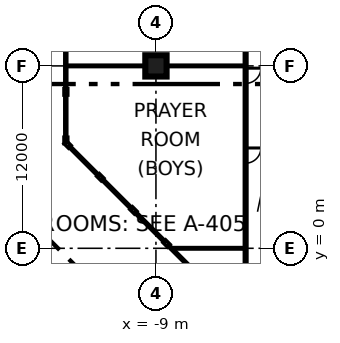
"""IFC4 building model, lengths in metres.
Left out: names, types, materials, properties, quantities, classifications, styles, units other than length and angle.
Written with IfcOpenShell. Run it as: python <this file> out.ifc"""

import sys

from ifc_helpers import new_model, si_unit, direction, frame, frame_2d, origin, origin_2d, place, context, subcontext, project, spatial, rectangle, extrude, element, fill, save


model = new_model("IFC4")
c1 = context("Model", 3, precision=1e-05, world=origin(), true_north=direction((0.0, 1.0)))
c2 = subcontext(c1, "Body", "Model", "MODEL_VIEW")
j1 = project(units=[si_unit("LENGTHUNIT", "METRE"), si_unit("PLANEANGLEUNIT", "RADIAN")], contexts=[c1])
p1 = place(None, origin())
s1 = spatial("IfcSite", under=j1, at=p1, CompositionType="ELEMENT")
p2 = place(p1, origin())
s2 = spatial("IfcBuilding", under=s1, at=p2, CompositionType="ELEMENT")
p3 = place(p2, origin())
s3 = spatial("IfcBuildingStorey", under=s2, at=p3, CompositionType="ELEMENT", Elevation=0.0)
p4 = place(p3, frame((-9.0, 12.0, 0.0), z_axis=(0.0, 0.0, 1.0), x_axis=(1.0, 0.0, 0.0)))
e1 = element("IfcColumn", 1, at=p4, inside=s3, PredefinedType="COLUMN", context=c2, shape_type="SweptSolid", body=[
    extrude(rectangle(XDim=1.4, YDim=1.4, at=origin_2d()), origin(), (0.0, 0.0, 1.0), 7.2),
])
p5 = place(p3, frame((-14.925, 12.0, 0.0), z_axis=(0.0, 0.0, 1.0), x_axis=(1.0, 0.0, 0.0)))
e2 = element("IfcWall", 2, at=p5, inside=s3, PredefinedType="PARTITIONING", context=c2, shape_type="SweptSolid", body=[
    extrude(rectangle(XDim=11.725, YDim=0.125, at=frame_2d((5.863, 0.0))), origin(), (0.0, 0.0, 1.0), 6.8),
])
p6 = place(p3, frame((-7.986, 0.0, 0.0), z_axis=(0.0, 0.0, 1.0), x_axis=(1.0, 0.0, 0.0)))
e3 = element("IfcWall", 3, at=p6, inside=s3, PredefinedType="PARTITIONING", context=c2, shape_type="SweptSolid", body=[
    extrude(rectangle(XDim=4.786, YDim=0.125, at=frame_2d((2.393, 0.0))), origin(), (0.0, 0.0, 1.0), 6.8),
])
p7 = place(p3, frame((-3.1, -3.0, 0.0), z_axis=(0.0, 0.0, 1.0), x_axis=(0.0, 1.0, 0.0)))
e4 = element("IfcWall", 4, at=p7, inside=s3, PredefinedType="PARTITIONING", context=c2, shape_type="SweptSolid", body=[
    extrude(rectangle(XDim=69.1, YDim=0.2, at=frame_2d((34.55, 0.0))), origin(), (0.0, 0.0, 1.0), 6.8),
])
p8 = place(p7, frame((8.6, 0.0, 0.0)))
e5 = element("IfcOpeningElement", 5, at=p8, cuts=e4, PredefinedType="OPENING", context=c2, shape_type="SweptSolid", body=[
    extrude(rectangle(XDim=1.0, YDim=2.1, at=frame_2d((0.5, 1.05))), frame((0.0, 0.11, 0.0), z_axis=(0.0, -1.0, 0.0), x_axis=(1.0, 0.0, 0.0)), (0.0, 0.0, 1.0), 0.22),
])
p9 = place(p7, frame((13.85, 0.0, 0.0)))
e6 = element("IfcOpeningElement", 6, at=p9, cuts=e4, PredefinedType="OPENING", context=c2, shape_type="SweptSolid", body=[
    extrude(rectangle(XDim=1.0, YDim=2.1, at=frame_2d((0.5, 1.05))), frame((0.0, 0.11, 0.0), z_axis=(0.0, -1.0, 0.0), x_axis=(1.0, 0.0, 0.0)), (0.0, 0.0, 1.0), 0.22),
])
p10 = place(p7, frame((18.6, 0.0, 0.0)))
e7 = element("IfcOpeningElement", 7, at=p10, cuts=e4, PredefinedType="OPENING", context=c2, shape_type="SweptSolid", body=[
    extrude(rectangle(XDim=1.0, YDim=2.1, at=frame_2d((0.5, 1.05))), frame((0.0, 0.11, 0.0), z_axis=(0.0, -1.0, 0.0), x_axis=(1.0, 0.0, 0.0)), (0.0, 0.0, 1.0), 0.22),
])
p11 = place(p7, frame((66.95, 0.0, 0.0)))
e8 = element("IfcOpeningElement", 8, at=p11, cuts=e4, PredefinedType="OPENING", context=c2, shape_type="SweptSolid", body=[
    extrude(rectangle(XDim=1.0, YDim=2.1, at=frame_2d((0.5, 1.05))), frame((0.0, 0.11, 0.0), z_axis=(0.0, -1.0, 0.0), x_axis=(1.0, 0.0, 0.0)), (0.0, 0.0, 1.0), 0.22),
])
p12 = place(p7, frame((59.85, 0.0, 0.0)))
e9 = element("IfcOpeningElement", 9, at=p12, cuts=e4, PredefinedType="OPENING", context=c2, shape_type="SweptSolid", body=[
    extrude(rectangle(XDim=1.8, YDim=2.1, at=frame_2d((0.9, 1.05))), frame((0.0, 0.11, 0.0), z_axis=(0.0, -1.0, 0.0), x_axis=(1.0, 0.0, 0.0)), (0.0, 0.0, 1.0), 0.22),
])
p13 = place(p7, frame((49.85, 0.0, 0.0)))
e10 = element("IfcOpeningElement", 10, at=p13, cuts=e4, PredefinedType="OPENING", context=c2, shape_type="SweptSolid", body=[
    extrude(rectangle(XDim=1.8, YDim=2.1, at=frame_2d((0.9, 1.05))), frame((0.0, 0.11, 0.0), z_axis=(0.0, -1.0, 0.0), x_axis=(1.0, 0.0, 0.0)), (0.0, 0.0, 1.0), 0.22),
])
p14 = place(p7, frame((29.85, 0.0, 0.0)))
e11 = element("IfcOpeningElement", 11, at=p14, cuts=e4, PredefinedType="OPENING", context=c2, shape_type="SweptSolid", body=[
    extrude(rectangle(XDim=1.8, YDim=2.1, at=frame_2d((0.9, 1.05))), frame((0.0, 0.11, 0.0), z_axis=(0.0, -1.0, 0.0), x_axis=(1.0, 0.0, 0.0)), (0.0, 0.0, 1.0), 0.22),
])
p15 = place(p7, frame((39.6, 0.0, 0.0)))
e12 = element("IfcOpeningElement", 12, at=p15, cuts=e4, PredefinedType="OPENING", context=c2, shape_type="SweptSolid", body=[
    extrude(rectangle(XDim=1.8, YDim=2.1, at=frame_2d((0.9, 1.05))), frame((0.0, 0.11, 0.0), z_axis=(0.0, -1.0, 0.0), x_axis=(1.0, 0.0, 0.0)), (0.0, 0.0, 1.0), 0.22),
])
p16 = place(p7, frame((23.55, 0.0, 0.0)))
e13 = element("IfcOpeningElement", 13, at=p16, cuts=e4, PredefinedType="OPENING", context=c2, shape_type="SweptSolid", body=[
    extrude(rectangle(XDim=1.8, YDim=2.1, at=frame_2d((0.9, 1.05))), frame((0.0, 0.11, 0.0), z_axis=(0.0, -1.0, 0.0), x_axis=(1.0, 0.0, 0.0)), (0.0, 0.0, 1.0), 0.22),
])
p17 = place(p8, origin())
e14 = element("IfcDoor", 14, at=p17, inside=s3, OperationType="SINGLE_SWING_RIGHT", PredefinedType="DOOR", context=c2, shape_type="SweptSolid", body=[
    extrude(rectangle(XDim=1.0, YDim=2.1, at=frame_2d((0.5, 1.05))), frame((0.0, 0.025, 0.0), z_axis=(0.0, -1.0, 0.0), x_axis=(1.0, 0.0, 0.0)), (0.0, 0.0, 1.0), 0.05),
])
fill(e5, e14)
p18 = place(p9, origin())
e15 = element("IfcDoor", 15, at=p18, inside=s3, OperationType="SINGLE_SWING_RIGHT", PredefinedType="DOOR", context=c2, shape_type="SweptSolid", body=[
    extrude(rectangle(XDim=1.0, YDim=2.1, at=frame_2d((0.5, 1.05))), frame((0.0, 0.025, 0.0), z_axis=(0.0, -1.0, 0.0), x_axis=(1.0, 0.0, 0.0)), (0.0, 0.0, 1.0), 0.05),
])
fill(e6, e15)
save(model, sys.argv[1])
